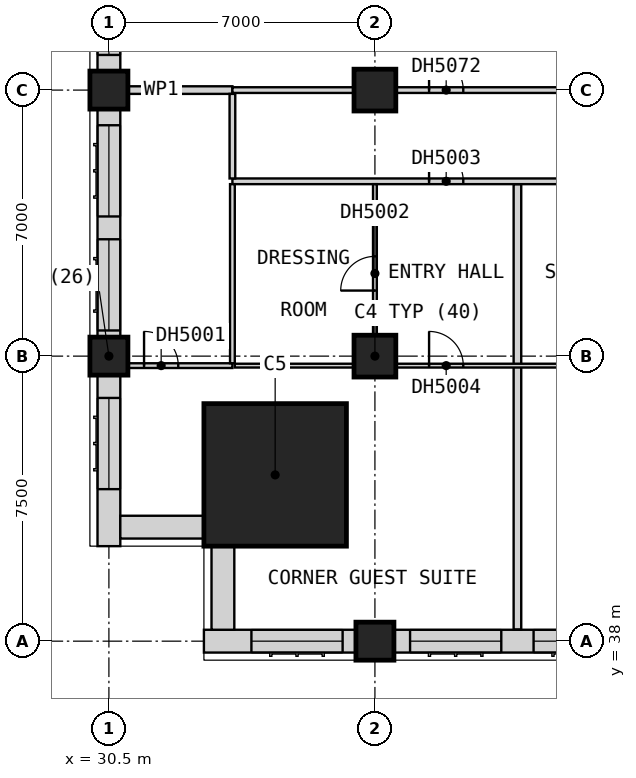
"""IFC4 building model, lengths in metres.
Left out: names, types, materials, properties, quantities, classifications, styles, units other than length and angle.
Written with IfcOpenShell. Run it as: python <this file> out.ifc"""

import sys

from ifc_helpers import new_model, si_unit, direction, frame, frame_2d, origin, origin_2d, place, context, subcontext, project, spatial, rectangle, extrude, element, fill, save


model = new_model("IFC4")
c1 = context("Model", 3, precision=1e-05, world=origin(), true_north=direction((0.0, 1.0)))
c2 = subcontext(c1, "Body", "Model", "MODEL_VIEW")
j1 = project(units=[si_unit("LENGTHUNIT", "METRE"), si_unit("PLANEANGLEUNIT", "RADIAN")], contexts=[c1])
p1 = place(None, origin())
s1 = spatial("IfcSite", under=j1, at=p1, CompositionType="ELEMENT")
p2 = place(p1, origin())
s2 = spatial("IfcBuilding", under=s1, at=p2, CompositionType="ELEMENT")
p3 = place(p2, frame((0.0, 0.0, 93.5)))
s3 = spatial("IfcBuildingStorey", under=s2, at=p3, CompositionType="ELEMENT", Elevation=93.5)
for number, where, z_axis, x_axis in (
    (1, (30.5, 45.5, 0.0), (0.0, 0.0, 1.0), (1.0, 0.0, 0.0)),
    (2, (30.5, 52.5, 0.0), (0.0, 0.0, 1.0), (1.0, 0.0, 0.0)),
    (3, (37.5, 38.0, 0.0), (0.0, 0.0, 1.0), (1.0, 0.0, 0.0)),
):
    element("IfcColumn", number, at=place(p3, frame(where, z_axis=z_axis, x_axis=x_axis)), inside=s3, PredefinedType="COLUMN", context=c2, shape_type="SweptSolid", body=[
        extrude(rectangle(XDim=1.0, YDim=1.0, at=origin_2d()), origin(), (0.0, 0.0, 1.0), 3.6),
    ])
for number, where, z_axis, x_axis in (
    (4, (37.5, 45.5, 0.0), (0.0, 0.0, 1.0), (1.0, 0.0, 0.0)),
    (5, (37.5, 52.5, 0.0), (0.0, 0.0, 1.0), (1.0, 0.0, 0.0)),
):
    element("IfcColumn", number, at=place(p3, frame(where, z_axis=z_axis, x_axis=x_axis)), inside=s3, PredefinedType="COLUMN", context=c2, shape_type="SweptSolid", body=[
        extrude(rectangle(XDim=1.1, YDim=1.1, at=origin_2d()), origin(), (0.0, 0.0, 1.0), 3.6),
    ])
p4 = place(p3, frame((34.875, 42.375, 0.0), z_axis=(0.0, 0.0, 1.0), x_axis=(1.0, 0.0, 0.0)))
e6 = element("IfcColumn", 6, at=p4, inside=s3, PredefinedType="COLUMN", context=c2, shape_type="SweptSolid", body=[
    extrude(rectangle(XDim=3.75, YDim=3.75, at=origin_2d()), origin(), (0.0, 0.0, 1.0), 3.6),
])
p5 = place(p3, frame((33.0, 38.0, 0.0), z_axis=(0.0, 0.0, 1.0), x_axis=(1.0, 0.0, 0.0)))
e7 = element("IfcWall", 7, at=p5, inside=s3, PredefinedType="SOLIDWALL", context=c2, shape_type="SweptSolid", body=[
    extrude(rectangle(XDim=4.0, YDim=0.6, at=frame_2d((2.0, 0.0))), origin(), (0.0, 0.0, 1.0), 3.35),
])
p6 = place(p5, frame((1.25, 0.0, 0.8)))
e8 = element("IfcOpeningElement", 8, at=p6, cuts=e7, PredefinedType="OPENING", context=c2, shape_type="SweptSolid", body=[
    extrude(rectangle(XDim=2.4, YDim=1.8, at=frame_2d((1.2, 0.9))), frame((0.0, 0.31, 0.0), z_axis=(0.0, -1.0, 0.0), x_axis=(1.0, 0.0, 0.0)), (0.0, 0.0, 1.0), 0.62),
])
p7 = place(p3, frame((38.0, 38.0, 0.0), z_axis=(0.0, 0.0, 1.0), x_axis=(1.0, 0.0, 0.0)))
e9 = element("IfcWall", 9, at=p7, inside=s3, PredefinedType="SOLIDWALL", context=c2, shape_type="SweptSolid", body=[
    extrude(rectangle(XDim=6.5, YDim=0.6, at=frame_2d((3.25, 0.0))), origin(), (0.0, 0.0, 1.0), 2.85),
])
p8 = place(p7, frame((0.425, 0.0, 0.8)))
e10 = element("IfcOpeningElement", 10, at=p8, cuts=e9, PredefinedType="OPENING", context=c2, shape_type="SweptSolid", body=[
    extrude(rectangle(XDim=2.4, YDim=1.8, at=frame_2d((1.2, 0.9))), frame((0.0, 0.31, 0.0), z_axis=(0.0, -1.0, 0.0), x_axis=(1.0, 0.0, 0.0)), (0.0, 0.0, 1.0), 0.62),
])
p9 = place(p7, frame((3.675, 0.0, 0.8)))
e11 = element("IfcOpeningElement", 11, at=p9, cuts=e9, PredefinedType="OPENING", context=c2, shape_type="SweptSolid", body=[
    extrude(rectangle(XDim=2.4, YDim=1.8, at=frame_2d((1.2, 0.9))), frame((0.0, 0.31, 0.0), z_axis=(0.0, -1.0, 0.0), x_axis=(1.0, 0.0, 0.0)), (0.0, 0.0, 1.0), 0.62),
])
p10 = place(p3, frame((30.5, 60.0, 0.0), z_axis=(0.0, 0.0, 1.0), x_axis=(0.0, -1.0, 0.0)))
e12 = element("IfcWall", 12, at=p10, inside=s3, PredefinedType="SOLIDWALL", context=c2, shape_type="SweptSolid", body=[
    extrude(rectangle(XDim=7.0, YDim=0.6, at=frame_2d((3.5, 0.0))), origin(), (0.0, 0.0, 1.0), 3.35),
])
p11 = place(p10, frame((4.175, 0.0, 0.8)))
e13 = element("IfcOpeningElement", 13, at=p11, cuts=e12, PredefinedType="OPENING", context=c2, shape_type="SweptSolid", body=[
    extrude(rectangle(XDim=2.4, YDim=1.8, at=frame_2d((1.2, 0.9))), frame((0.0, 0.31, 0.0), z_axis=(0.0, -1.0, 0.0), x_axis=(1.0, 0.0, 0.0)), (0.0, 0.0, 1.0), 0.62),
])
p12 = place(p10, frame((0.675, 0.0, 0.8)))
e14 = element("IfcOpeningElement", 14, at=p12, cuts=e12, PredefinedType="OPENING", context=c2, shape_type="SweptSolid", body=[
    extrude(rectangle(XDim=2.4, YDim=1.8, at=frame_2d((1.2, 0.9))), frame((0.0, 0.31, 0.0), z_axis=(0.0, -1.0, 0.0), x_axis=(1.0, 0.0, 0.0)), (0.0, 0.0, 1.0), 0.62),
])
p13 = place(p3, frame((30.5, 52.0, 0.0), z_axis=(0.0, 0.0, 1.0), x_axis=(0.0, -1.0, 0.0)))
e15 = element("IfcWall", 15, at=p13, inside=s3, PredefinedType="SOLIDWALL", context=c2, shape_type="SweptSolid", body=[
    extrude(rectangle(XDim=6.0, YDim=0.6, at=frame_2d((3.0, 0.0))), origin(), (0.0, 0.0, 1.0), 2.85),
])
p14 = place(p13, frame((3.425, 0.0, 0.8)))
e16 = element("IfcOpeningElement", 16, at=p14, cuts=e15, PredefinedType="OPENING", context=c2, shape_type="SweptSolid", body=[
    extrude(rectangle(XDim=2.4, YDim=1.8, at=frame_2d((1.2, 0.9))), frame((0.0, 0.31, 0.0), z_axis=(0.0, -1.0, 0.0), x_axis=(1.0, 0.0, 0.0)), (0.0, 0.0, 1.0), 0.62),
])
p15 = place(p13, frame((0.425, 0.0, 0.8)))
e17 = element("IfcOpeningElement", 17, at=p15, cuts=e15, PredefinedType="OPENING", context=c2, shape_type="SweptSolid", body=[
    extrude(rectangle(XDim=2.4, YDim=1.8, at=frame_2d((1.2, 0.9))), frame((0.0, 0.31, 0.0), z_axis=(0.0, -1.0, 0.0), x_axis=(1.0, 0.0, 0.0)), (0.0, 0.0, 1.0), 0.62),
])
p16 = place(p3, frame((30.5, 45.0, 0.0), z_axis=(0.0, 0.0, 1.0), x_axis=(0.0, -1.0, 0.0)))
e18 = element("IfcWall", 18, at=p16, inside=s3, PredefinedType="SOLIDWALL", context=c2, shape_type="SweptSolid", body=[
    extrude(rectangle(XDim=4.5, YDim=0.6, at=frame_2d((2.25, 0.0))), origin(), (0.0, 0.0, 1.0), 2.85),
])
p17 = place(p16, frame((0.6, 0.0, 0.8)))
e19 = element("IfcOpeningElement", 19, at=p17, cuts=e18, PredefinedType="OPENING", context=c2, shape_type="SweptSolid", body=[
    extrude(rectangle(XDim=2.4, YDim=1.8, at=frame_2d((1.2, 0.9))), frame((0.0, 0.31, 0.0), z_axis=(0.0, -1.0, 0.0), x_axis=(1.0, 0.0, 0.0)), (0.0, 0.0, 1.0), 0.62),
])
for number, where, z_axis, x_axis in (
    (20, (30.8, 41.0, 0.0), (0.0, 0.0, 1.0), (1.0, 0.0, 0.0)),
    (21, (33.5, 40.5, 0.0), (0.0, 0.0, 1.0), (0.0, -1.0, 0.0)),
):
    element("IfcWall", number, at=place(p3, frame(where, z_axis=z_axis, x_axis=x_axis)), inside=s3, PredefinedType="SOLIDWALL", context=c2, shape_type="SweptSolid", body=[
        extrude(rectangle(XDim=2.2, YDim=0.6, at=frame_2d((1.1, 0.0))), origin(), (0.0, 0.0, 1.0), 3.35),
    ])
p18 = place(p3, frame((30.0, 52.5, 0.0), z_axis=(0.0, 0.0, 1.0), x_axis=(1.0, 0.0, 0.0)))
e22 = element("IfcWall", 22, at=p18, inside=s3, PredefinedType="PARTITIONING", context=c2, shape_type="SweptSolid", body=[
    extrude(rectangle(XDim=3.75, YDim=0.2, at=frame_2d((1.875, 0.0))), origin(), (0.0, 0.0, 1.0), 3.35),
])
p19 = place(p3, frame((41.25, 38.31, 0.0), z_axis=(0.0, 0.0, 1.0), x_axis=(0.0, 1.0, 0.0)))
e23 = element("IfcWall", 23, at=p19, inside=s3, PredefinedType="PARTITIONING", context=c2, shape_type="SweptSolid", body=[
    extrude(rectangle(XDim=11.715, YDim=0.2, at=frame_2d((5.857, 0.0))), origin(), (0.0, 0.0, 1.0), 3.35),
])
p20 = place(p3, frame((33.75, 50.1, 0.0), z_axis=(0.0, 0.0, 1.0), x_axis=(1.0, 0.0, 0.0)))
e24 = element("IfcWall", 24, at=p20, inside=s3, PredefinedType="PARTITIONING", context=c2, shape_type="SweptSolid", body=[
    extrude(rectangle(XDim=43.65, YDim=0.15, at=frame_2d((21.825, 0.0))), origin(), (0.0, 0.0, 1.0), 3.35),
])
p21 = place(p20, frame((5.175, 0.0, 0.0)))
e25 = element("IfcOpeningElement", 25, at=p21, cuts=e24, PredefinedType="OPENING", context=c2, shape_type="SweptSolid", body=[
    extrude(rectangle(XDim=0.9, YDim=2.1, at=frame_2d((0.45, 1.05))), frame((0.0, 0.085, 0.0), z_axis=(0.0, -1.0, 0.0), x_axis=(1.0, 0.0, 0.0)), (0.0, 0.0, 1.0), 0.17),
])
p22 = place(p20, frame((9.3, 0.0, 0.0)))
e26 = element("IfcOpeningElement", 26, at=p22, cuts=e24, PredefinedType="OPENING", context=c2, shape_type="SweptSolid", body=[
    extrude(rectangle(XDim=0.9, YDim=2.1, at=frame_2d((0.45, 1.05))), frame((0.0, 0.085, 0.0), z_axis=(0.0, -1.0, 0.0), x_axis=(1.0, 0.0, 0.0)), (0.0, 0.0, 1.0), 0.17),
])
p23 = place(p20, frame((24.438, 0.0, 0.0)))
e27 = element("IfcOpeningElement", 27, at=p23, cuts=e24, PredefinedType="OPENING", context=c2, shape_type="SweptSolid", body=[
    extrude(rectangle(XDim=1.0, YDim=2.1, at=frame_2d((0.5, 1.05))), frame((0.0, 0.085, 0.0), z_axis=(0.0, -1.0, 0.0), x_axis=(1.0, 0.0, 0.0)), (0.0, 0.0, 1.0), 0.17),
])
p24 = place(p20, frame((28.613, 0.0, 0.0)))
e28 = element("IfcOpeningElement", 28, at=p24, cuts=e24, PredefinedType="OPENING", context=c2, shape_type="SweptSolid", body=[
    extrude(rectangle(XDim=0.9, YDim=2.1, at=frame_2d((0.45, 1.05))), frame((0.0, 0.085, 0.0), z_axis=(0.0, -1.0, 0.0), x_axis=(1.0, 0.0, 0.0)), (0.0, 0.0, 1.0), 0.17),
])
p25 = place(p20, frame((31.8, 0.0, 0.0)))
e29 = element("IfcOpeningElement", 29, at=p25, cuts=e24, PredefinedType="OPENING", context=c2, shape_type="SweptSolid", body=[
    extrude(rectangle(XDim=0.9, YDim=2.1, at=frame_2d((0.45, 1.05))), frame((0.0, 0.085, 0.0), z_axis=(0.0, -1.0, 0.0), x_axis=(1.0, 0.0, 0.0)), (0.0, 0.0, 1.0), 0.17),
])
p26 = place(p20, frame((42.0, 0.0, 0.0)))
e30 = element("IfcOpeningElement", 30, at=p26, cuts=e24, PredefinedType="OPENING", context=c2, shape_type="SweptSolid", body=[
    extrude(rectangle(XDim=0.9, YDim=2.1, at=frame_2d((0.45, 1.05))), frame((0.0, 0.085, 0.0), z_axis=(0.0, -1.0, 0.0), x_axis=(1.0, 0.0, 0.0)), (0.0, 0.0, 1.0), 0.17),
])
p27 = place(p3, frame((33.75, 52.5, 0.0), z_axis=(0.0, 0.0, 1.0), x_axis=(1.0, 0.0, 0.0)))
e31 = element("IfcWall", 31, at=p27, inside=s3, PredefinedType="PARTITIONING", context=c2, shape_type="SweptSolid", body=[
    extrude(rectangle(XDim=17.15, YDim=0.15, at=frame_2d((8.575, 0.0))), origin(), (0.0, 0.0, 1.0), 3.35),
])
p28 = place(p27, frame((5.175, 0.0, 0.0)))
e32 = element("IfcOpeningElement", 32, at=p28, cuts=e31, PredefinedType="OPENING", context=c2, shape_type="SweptSolid", body=[
    extrude(rectangle(XDim=0.9, YDim=2.1, at=frame_2d((0.45, 1.05))), frame((0.0, 0.085, 0.0), z_axis=(0.0, -1.0, 0.0), x_axis=(1.0, 0.0, 0.0)), (0.0, 0.0, 1.0), 0.17),
])
p29 = place(p27, frame((13.75, 0.0, 0.0)))
e33 = element("IfcOpeningElement", 33, at=p29, cuts=e31, PredefinedType="OPENING", context=c2, shape_type="SweptSolid", body=[
    extrude(rectangle(XDim=0.9, YDim=2.1, at=frame_2d((0.45, 1.05))), frame((0.0, 0.085, 0.0), z_axis=(0.0, -1.0, 0.0), x_axis=(1.0, 0.0, 0.0)), (0.0, 0.0, 1.0), 0.17),
])
p30 = place(p3, frame((33.75, 50.175, 0.0), z_axis=(0.0, 0.0, 1.0), x_axis=(0.0, 1.0, 0.0)))
e34 = element("IfcWall", 34, at=p30, inside=s3, PredefinedType="PARTITIONING", context=c2, shape_type="SweptSolid", body=[
    extrude(rectangle(XDim=2.225, YDim=0.15, at=frame_2d((1.112, 0.0))), origin(), (0.0, 0.0, 1.0), 3.35),
])
p31 = place(p3, frame((33.812, 45.25, 0.0), z_axis=(0.0, 0.0, 1.0), x_axis=(1.0, 0.0, 0.0)))
e35 = element("IfcWall", 35, at=p31, inside=s3, PredefinedType="PARTITIONING", context=c2, shape_type="SweptSolid", body=[
    extrude(rectangle(XDim=11.875, YDim=0.1, at=frame_2d((5.938, 0.0))), origin(), (0.0, 0.0, 1.0), 3.35),
])
p32 = place(p31, frame((5.113, 0.0, 0.0)))
e36 = element("IfcOpeningElement", 36, at=p32, cuts=e35, PredefinedType="OPENING", context=c2, shape_type="SweptSolid", body=[
    extrude(rectangle(XDim=0.9, YDim=2.1, at=frame_2d((0.45, 1.05))), frame((0.0, 0.06, 0.0), z_axis=(0.0, -1.0, 0.0), x_axis=(1.0, 0.0, 0.0)), (0.0, 0.0, 1.0), 0.12),
])
p33 = place(p31, frame((9.238, 0.0, 0.0)))
e37 = element("IfcOpeningElement", 37, at=p33, cuts=e35, PredefinedType="OPENING", context=c2, shape_type="SweptSolid", body=[
    extrude(rectangle(XDim=0.9, YDim=2.1, at=frame_2d((0.45, 1.05))), frame((0.0, 0.06, 0.0), z_axis=(0.0, -1.0, 0.0), x_axis=(1.0, 0.0, 0.0)), (0.0, 0.0, 1.0), 0.12),
])
p34 = place(p3, frame((37.5, 45.3, 0.0), z_axis=(0.0, 0.0, 1.0), x_axis=(0.0, 1.0, 0.0)))
e38 = element("IfcWall", 38, at=p34, inside=s3, PredefinedType="PARTITIONING", context=c2, shape_type="SweptSolid", body=[
    extrude(rectangle(XDim=4.725, YDim=0.1, at=frame_2d((2.362, 0.0))), origin(), (0.0, 0.0, 1.0), 3.35),
])
p35 = place(p34, frame((1.925, 0.0, 0.0)))
e39 = element("IfcOpeningElement", 39, at=p35, cuts=e38, PredefinedType="OPENING", context=c2, shape_type="SweptSolid", body=[
    extrude(rectangle(XDim=0.9, YDim=2.1, at=frame_2d((0.45, 1.05))), frame((0.0, 0.06, 0.0), z_axis=(0.0, -1.0, 0.0), x_axis=(1.0, 0.0, 0.0)), (0.0, 0.0, 1.0), 0.12),
])
p36 = place(p3, frame((30.0, 45.25, 0.0), z_axis=(0.0, 0.0, 1.0), x_axis=(1.0, 0.0, 0.0)))
e40 = element("IfcWall", 40, at=p36, inside=s3, PredefinedType="PARTITIONING", context=c2, shape_type="SweptSolid", body=[
    extrude(rectangle(XDim=3.75, YDim=0.125, at=frame_2d((1.875, 0.0))), origin(), (0.0, 0.0, 1.0), 3.35),
])
p37 = place(p36, frame((1.425, 0.0, 0.0)))
e41 = element("IfcOpeningElement", 41, at=p37, cuts=e40, PredefinedType="OPENING", context=c2, shape_type="SweptSolid", body=[
    extrude(rectangle(XDim=0.9, YDim=2.1, at=frame_2d((0.45, 1.05))), frame((0.0, 0.073, 0.0), z_axis=(0.0, -1.0, 0.0), x_axis=(1.0, 0.0, 0.0)), (0.0, 0.0, 1.0), 0.145),
])
p38 = place(p3, frame((33.75, 45.312, 0.0), z_axis=(0.0, 0.0, 1.0), x_axis=(0.0, 1.0, 0.0)))
e42 = element("IfcWall", 42, at=p38, inside=s3, PredefinedType="PARTITIONING", context=c2, shape_type="SweptSolid", body=[
    extrude(rectangle(XDim=4.712, YDim=0.125, at=frame_2d((2.356, 0.0))), origin(), (0.0, 0.0, 1.0), 3.35),
])
p39 = place(p6, origin())
e43 = element("IfcWindow", 43, at=p39, inside=s3, PartitioningType="SINGLE_PANEL", PredefinedType="WINDOW", context=c2, shape_type="SweptSolid", body=[
    extrude(rectangle(XDim=2.4, YDim=1.8, at=frame_2d((1.2, 0.9))), frame((0.0, -0.07, 0.0), z_axis=(0.0, -1.0, 0.0), x_axis=(1.0, 0.0, 0.0)), (0.0, 0.0, 1.0), 0.06),
])
fill(e8, e43)
p40 = place(p8, origin())
e44 = element("IfcWindow", 44, at=p40, inside=s3, PartitioningType="SINGLE_PANEL", PredefinedType="WINDOW", context=c2, shape_type="SweptSolid", body=[
    extrude(rectangle(XDim=2.4, YDim=1.8, at=frame_2d((1.2, 0.9))), frame((0.0, -0.07, 0.0), z_axis=(0.0, -1.0, 0.0), x_axis=(1.0, 0.0, 0.0)), (0.0, 0.0, 1.0), 0.06),
])
fill(e10, e44)
p41 = place(p9, origin())
e45 = element("IfcWindow", 45, at=p41, inside=s3, PartitioningType="SINGLE_PANEL", PredefinedType="WINDOW", context=c2, shape_type="SweptSolid", body=[
    extrude(rectangle(XDim=2.4, YDim=1.8, at=frame_2d((1.2, 0.9))), frame((0.0, -0.07, 0.0), z_axis=(0.0, -1.0, 0.0), x_axis=(1.0, 0.0, 0.0)), (0.0, 0.0, 1.0), 0.06),
])
fill(e11, e45)
p42 = place(p11, origin())
e46 = element("IfcWindow", 46, at=p42, inside=s3, PartitioningType="SINGLE_PANEL", PredefinedType="WINDOW", context=c2, shape_type="SweptSolid", body=[
    extrude(rectangle(XDim=2.4, YDim=1.8, at=frame_2d((1.2, 0.9))), frame((0.0, -0.07, 0.0), z_axis=(0.0, -1.0, 0.0), x_axis=(1.0, 0.0, 0.0)), (0.0, 0.0, 1.0), 0.06),
])
fill(e13, e46)
p43 = place(p14, origin())
e47 = element("IfcWindow", 47, at=p43, inside=s3, PartitioningType="SINGLE_PANEL", PredefinedType="WINDOW", context=c2, shape_type="SweptSolid", body=[
    extrude(rectangle(XDim=2.4, YDim=1.8, at=frame_2d((1.2, 0.9))), frame((0.0, -0.07, 0.0), z_axis=(0.0, -1.0, 0.0), x_axis=(1.0, 0.0, 0.0)), (0.0, 0.0, 1.0), 0.06),
])
fill(e16, e47)
p44 = place(p15, origin())
e48 = element("IfcWindow", 48, at=p44, inside=s3, PartitioningType="SINGLE_PANEL", PredefinedType="WINDOW", context=c2, shape_type="SweptSolid", body=[
    extrude(rectangle(XDim=2.4, YDim=1.8, at=frame_2d((1.2, 0.9))), frame((0.0, -0.07, 0.0), z_axis=(0.0, -1.0, 0.0), x_axis=(1.0, 0.0, 0.0)), (0.0, 0.0, 1.0), 0.06),
])
fill(e17, e48)
p45 = place(p17, origin())
e49 = element("IfcWindow", 49, at=p45, inside=s3, PartitioningType="SINGLE_PANEL", PredefinedType="WINDOW", context=c2, shape_type="SweptSolid", body=[
    extrude(rectangle(XDim=2.4, YDim=1.8, at=frame_2d((1.2, 0.9))), frame((0.0, -0.07, 0.0), z_axis=(0.0, -1.0, 0.0), x_axis=(1.0, 0.0, 0.0)), (0.0, 0.0, 1.0), 0.06),
])
fill(e19, e49)
p46 = place(p37, origin())
e50 = element("IfcDoor", 50, at=p46, inside=s3, OperationType="SINGLE_SWING_LEFT", PredefinedType="DOOR", context=c2, shape_type="SweptSolid", body=[
    extrude(rectangle(XDim=0.9, YDim=2.1, at=frame_2d((0.45, 1.05))), frame((0.0, 0.025, 0.0), z_axis=(0.0, -1.0, 0.0), x_axis=(1.0, 0.0, 0.0)), (0.0, 0.0, 1.0), 0.05),
])
fill(e41, e50)
p47 = place(p35, origin())
e51 = element("IfcDoor", 51, at=p47, inside=s3, OperationType="SINGLE_SWING_RIGHT", PredefinedType="DOOR", context=c2, shape_type="SweptSolid", body=[
    extrude(rectangle(XDim=0.9, YDim=2.1, at=frame_2d((0.45, 1.05))), frame((0.0, 0.025, 0.0), z_axis=(0.0, -1.0, 0.0), x_axis=(1.0, 0.0, 0.0)), (0.0, 0.0, 1.0), 0.05),
])
fill(e39, e51)
p48 = place(p21, origin())
e52 = element("IfcDoor", 52, at=p48, inside=s3, OperationType="SINGLE_SWING_RIGHT", PredefinedType="DOOR", context=c2, shape_type="SweptSolid", body=[
    extrude(rectangle(XDim=0.9, YDim=2.1, at=frame_2d((0.45, 1.05))), frame((0.0, 0.025, 0.0), z_axis=(0.0, -1.0, 0.0), x_axis=(1.0, 0.0, 0.0)), (0.0, 0.0, 1.0), 0.05),
])
fill(e25, e52)
p49 = place(p32, origin())
e53 = element("IfcDoor", 53, at=p49, inside=s3, OperationType="SINGLE_SWING_LEFT", PredefinedType="DOOR", context=c2, shape_type="SweptSolid", body=[
    extrude(rectangle(XDim=0.9, YDim=2.1, at=frame_2d((0.45, 1.05))), frame((0.0, 0.025, 0.0), z_axis=(0.0, -1.0, 0.0), x_axis=(1.0, 0.0, 0.0)), (0.0, 0.0, 1.0), 0.05),
])
fill(e36, e53)
p50 = place(p28, origin())
e54 = element("IfcDoor", 54, at=p50, inside=s3, OperationType="SINGLE_SWING_LEFT", PredefinedType="DOOR", context=c2, shape_type="SweptSolid", body=[
    extrude(rectangle(XDim=0.9, YDim=2.1, at=frame_2d((0.45, 1.05))), frame((0.0, 0.025, 0.0), z_axis=(0.0, -1.0, 0.0), x_axis=(1.0, 0.0, 0.0)), (0.0, 0.0, 1.0), 0.05),
])
fill(e32, e54)
save(model, sys.argv[1])
